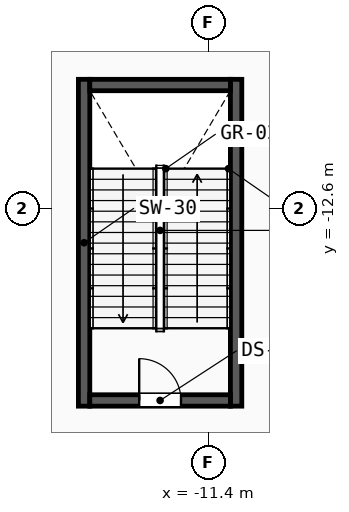
"""IFC4 building model, lengths in metres.
Left out: names, types, materials, properties, quantities, classifications, styles, units other than length and angle.
Written with IfcOpenShell. Run it as: python <this file> out.ifc"""

import sys

from ifc_helpers import new_model, si_unit, direction, frame, frame_2d, origin, place, context, subcontext, project, spatial, rectangle, extrude, element, fill, save


model = new_model("IFC4")
c1 = context("Model", 3, precision=1e-05, world=origin(), true_north=direction((0.0, 1.0)))
c2 = subcontext(c1, "Body", "Model", "MODEL_VIEW")
j1 = project(units=[si_unit("LENGTHUNIT", "METRE"), si_unit("PLANEANGLEUNIT", "RADIAN")], contexts=[c1])
p1 = place(None, origin())
s1 = spatial("IfcSite", under=j1, at=p1, CompositionType="ELEMENT")
p2 = place(p1, origin())
s2 = spatial("IfcBuilding", under=s1, at=p2, CompositionType="ELEMENT")
p3 = place(p2, frame((0.0, 0.0, 6.0)))
s3 = spatial("IfcBuildingStorey", under=s2, at=p3, CompositionType="ELEMENT", Elevation=6.0)
for number, where, z_axis, x_axis in (
    (1, (-14.67, -17.8, 0.0), (0.0, 0.0, 1.0), (0.0, 1.0, 0.0)),
    (2, (-10.67, -17.8, 0.0), (0.0, 0.0, 1.0), (0.0, 1.0, 0.0)),
):
    element("IfcWall", number, at=place(p3, frame(where, z_axis=z_axis, x_axis=x_axis)), inside=s3, PredefinedType="SHEAR", context=c2, shape_type="SweptSolid", body=[
        extrude(rectangle(XDim=8.6, YDim=0.3, at=frame_2d((4.3, 0.0))), origin(), (0.0, 0.0, 1.0), 5.65),
    ])
p4 = place(p3, frame((-14.52, -17.65, 0.0), z_axis=(0.0, 0.0, 1.0), x_axis=(1.0, 0.0, 0.0)))
e3 = element("IfcWall", 3, at=p4, inside=s3, PredefinedType="SHEAR", context=c2, shape_type="SweptSolid", body=[
    extrude(rectangle(XDim=3.7, YDim=0.3, at=frame_2d((1.85, 0.0))), origin(), (0.0, 0.0, 1.0), 5.65),
])
p5 = place(p4, frame((1.3, 0.0, 0.0)))
e4 = element("IfcOpeningElement", 4, at=p5, cuts=e3, PredefinedType="OPENING", context=c2, shape_type="SweptSolid", body=[
    extrude(rectangle(XDim=1.1, YDim=2.15, at=frame_2d((0.55, 1.075))), frame((0.0, 0.16, 0.0), z_axis=(0.0, -1.0, 0.0), x_axis=(1.0, 0.0, 0.0)), (0.0, 0.0, 1.0), 0.32),
])
p6 = place(p3, frame((-14.52, -9.35, 0.0), z_axis=(0.0, 0.0, 1.0), x_axis=(1.0, 0.0, 0.0)))
e5 = element("IfcWall", 5, at=p6, inside=s3, PredefinedType="SHEAR", context=c2, shape_type="SweptSolid", body=[
    extrude(rectangle(XDim=3.7, YDim=0.3, at=frame_2d((1.85, 0.0))), origin(), (0.0, 0.0, 1.0), 5.65),
])
p7 = place(p5, origin())
e6 = element("IfcDoor", 6, at=p7, inside=s3, OperationType="SINGLE_SWING_LEFT", PredefinedType="DOOR", context=c2, shape_type="SweptSolid", body=[
    extrude(rectangle(XDim=1.1, YDim=2.15, at=frame_2d((0.55, 1.075))), frame((0.0, 0.025, 0.0), z_axis=(0.0, -1.0, 0.0), x_axis=(1.0, 0.0, 0.0)), (0.0, 0.0, 1.0), 0.05),
])
fill(e4, e6)
save(model, sys.argv[1])
